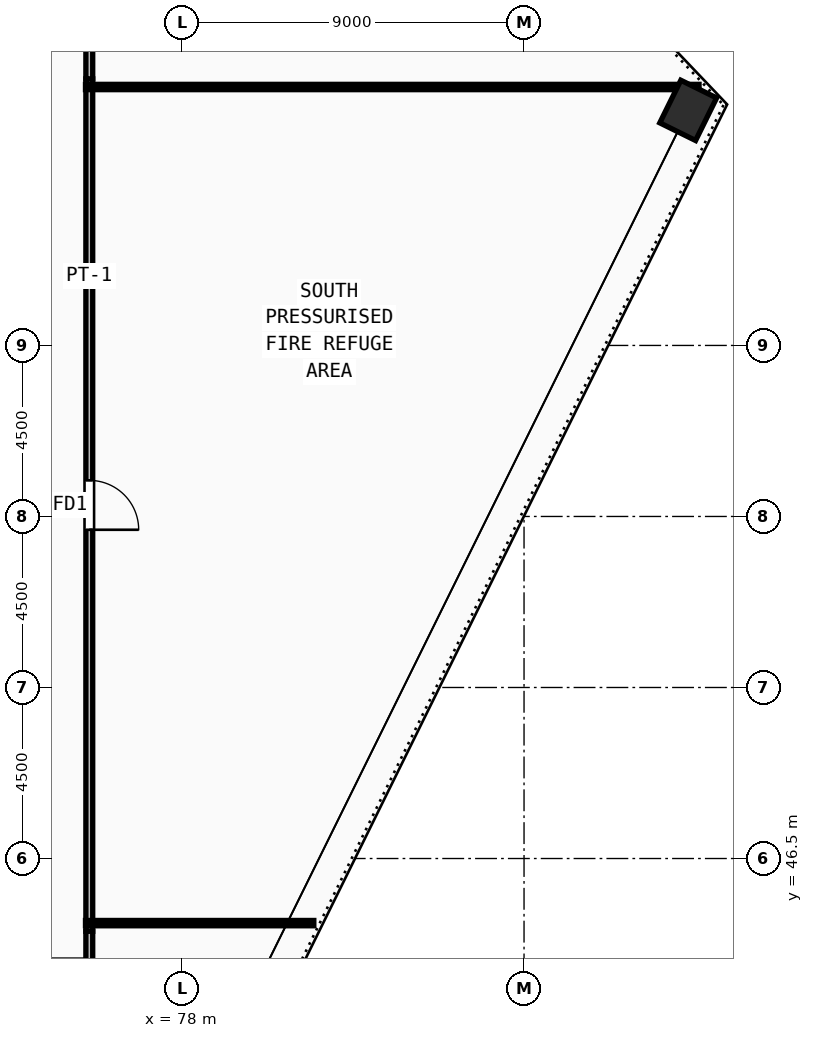
"""IFC4 building model, lengths in metres.
Left out: names, types, materials, properties, quantities, classifications, styles, units other than length and angle.
Written with IfcOpenShell. Run it as: python <this file> out.ifc"""

import sys

from ifc_helpers import new_model, si_unit, direction, frame, frame_2d, origin, origin_2d, place, context, subcontext, project, spatial, rectangle, extrude, source, transform, mapped, element, fill, save


model = new_model("IFC4")
c1 = context("Model", 3, precision=1e-05, world=origin(), true_north=direction((0.0, 1.0)))
c2 = subcontext(c1, "Body", "Model", "MODEL_VIEW")
j1 = project(units=[si_unit("LENGTHUNIT", "METRE"), si_unit("PLANEANGLEUNIT", "RADIAN")], contexts=[c1])
p1 = place(None, origin())
s1 = spatial("IfcSite", under=j1, at=p1, CompositionType="ELEMENT")
p2 = place(p1, origin())
s2 = spatial("IfcBuilding", under=s1, at=p2, CompositionType="ELEMENT")
p3 = place(p2, frame((0.0, 0.0, 277.5)))
s3 = spatial("IfcBuildingStorey", under=s2, at=p3, CompositionType="ELEMENT", Elevation=277.5)
m1 = source(origin(), c2, "Body", "SweptSolid", [
    extrude(rectangle(XDim=1.25, YDim=1.05, at=origin_2d()), origin(), (0.0, 0.0, 1.0), 4.5),
])
p4 = place(p3, frame((91.32, 66.185, 0.0), z_axis=(0.0, 0.0, 1.0), x_axis=(0.442601730913, 0.896718299017, 0.0)))
e1 = element("IfcColumn", 1, at=p4, inside=s3, PredefinedType="COLUMN", context=c2, shape_type="MappedRepresentation", body=[
    mapped(m1, transform((0.0, 0.0, 0.0), x_axis=(1.0, 0.0, 0.0), y_axis=(0.0, 1.0, 0.0), z_axis=(0.0, 0.0, 1.0), scale=1.0)),
])
p5 = place(p3, frame((75.56, 67.015, 0.0), z_axis=(0.0, 0.0, 1.0), x_axis=(0.0, -1.0, 0.0)))
e2 = element("IfcWall", 2, at=p5, inside=s3, PredefinedType="PARTITIONING", context=c2, shape_type="SweptSolid", body=[
    extrude(rectangle(XDim=22.43, YDim=0.18, at=frame_2d((11.215, 0.0))), origin(), (0.0, 0.0, 1.0), 4.22),
])
m2 = source(origin(), c2, "Body", "SweptSolid", [
    extrude(rectangle(XDim=1.3, YDim=2.2, at=frame_2d((0.65, 1.1))), frame((0.0, 0.1, 0.0), z_axis=(0.0, -1.0, 0.0), x_axis=(1.0, 0.0, 0.0)), (0.0, 0.0, 1.0), 0.2),
])
p6 = place(p5, frame((10.565, 0.0, 0.0)))
e3 = element("IfcOpeningElement", 3, at=p6, cuts=e2, PredefinedType="OPENING", context=c2, shape_type="MappedRepresentation", body=[
    mapped(m2, transform((0.0, 0.0, 0.0), x_axis=(1.0, 0.0, 0.0), y_axis=(0.0, 1.0, 0.0), z_axis=(0.0, 0.0, 1.0), scale=1.0)),
])
p7 = place(p3, frame((75.56, 67.98, 0.0), z_axis=(0.0, 0.0, 1.0), x_axis=(0.0, -1.0, 0.0)))
e4 = element("IfcWall", 4, at=p7, inside=s3, PredefinedType="PARTITIONING", context=c2, shape_type="SweptSolid", body=[
    extrude(rectangle(XDim=0.965, YDim=0.18, at=frame_2d((0.482, 0.0))), origin(), (0.0, 0.0, 1.0), 4.22),
])
p8 = place(p3, frame((75.56, 44.585, 0.0), z_axis=(0.0, 0.0, 1.0), x_axis=(0.0, -1.0, 0.0)))
e5 = element("IfcWall", 5, at=p8, inside=s3, PredefinedType="PARTITIONING", context=c2, shape_type="SweptSolid", body=[
    extrude(rectangle(XDim=0.915, YDim=0.18, at=frame_2d((0.458, 0.0))), origin(), (0.0, 0.0, 1.0), 4.22),
])
p9 = place(p3, frame((75.46, 44.8, 0.0), z_axis=(0.0, 0.0, 1.0), x_axis=(1.0, 0.0, 0.0)))
e6 = element("IfcWall", 6, at=p9, inside=s3, PredefinedType="PARTITIONING", context=c2, shape_type="SweptSolid", body=[
    extrude(rectangle(XDim=6.008, YDim=0.14, at=frame_2d((3.004, 0.0))), origin(), (0.0, 0.0, 1.0), 4.22),
])
p10 = place(p3, frame((75.46, 66.8, 0.0), z_axis=(0.0, 0.0, 1.0), x_axis=(1.0, 0.0, 0.0)))
e7 = element("IfcWall", 7, at=p10, inside=s3, PredefinedType="PARTITIONING", context=c2, shape_type="SweptSolid", body=[
    extrude(rectangle(XDim=16.145, YDim=0.14, at=frame_2d((8.073, 0.0))), origin(), (0.0, 0.0, 1.0), 4.22),
])
m3 = source(origin(), c2, "Body", "SweptSolid", [
    extrude(rectangle(XDim=1.3, YDim=2.2, at=frame_2d((0.65, 1.1))), frame((0.0, 0.025, 0.0), z_axis=(0.0, -1.0, 0.0), x_axis=(1.0, 0.0, 0.0)), (0.0, 0.0, 1.0), 0.05),
])
p11 = place(p6, origin())
e8 = element("IfcDoor", 8, at=p11, inside=s3, OperationType="SINGLE_SWING_RIGHT", PredefinedType="DOOR", context=c2, shape_type="MappedRepresentation", body=[
    mapped(m3, transform((0.0, 0.0, 0.0), x_axis=(1.0, 0.0, 0.0), y_axis=(0.0, 1.0, 0.0), z_axis=(0.0, 0.0, 1.0), scale=1.0)),
])
fill(e3, e8)
save(model, sys.argv[1])
